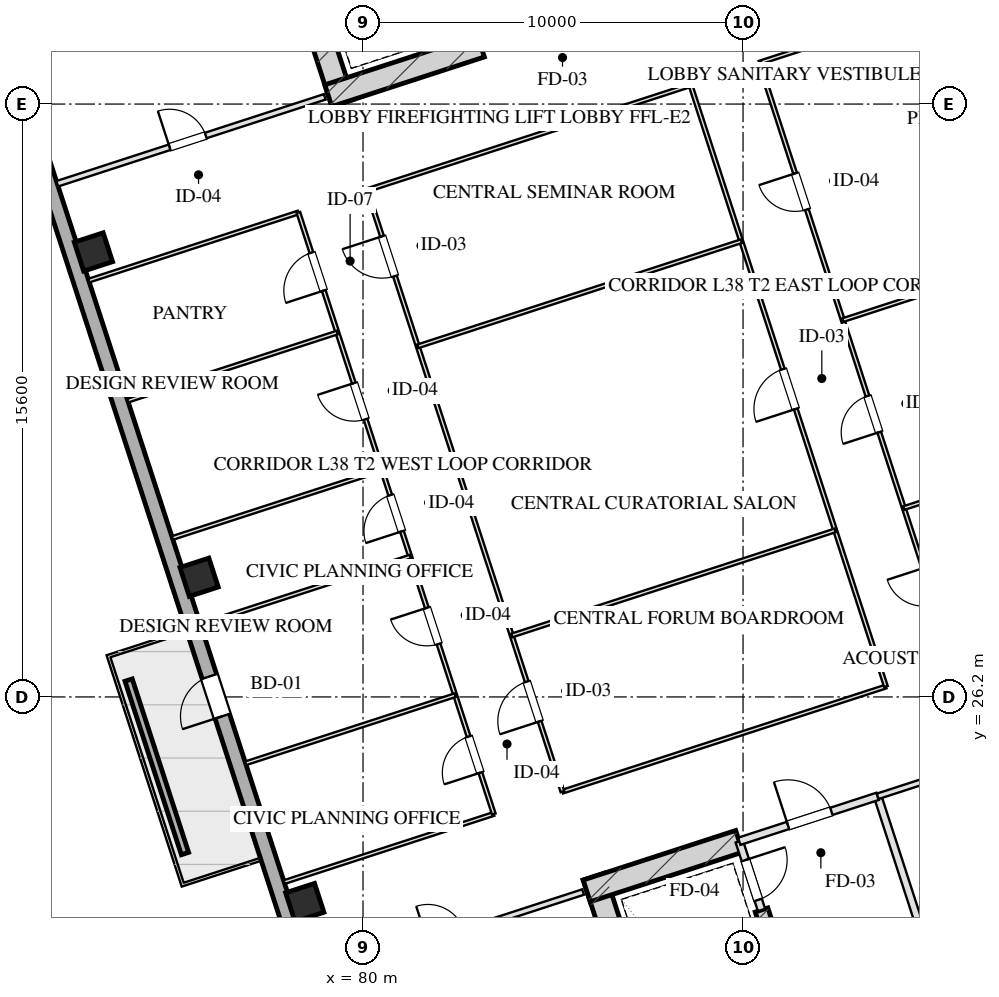
"""IFC4 building model, lengths in metres.
Left out: names, types, materials, properties, quantities, classifications, styles, units other than length and angle.
Written with IfcOpenShell. Run it as: python <this file> out.ifc"""

import sys

from ifc_helpers import new_model, si_unit, direction, frame, frame_2d, origin, origin_2d, place, context, subcontext, project, spatial, rectangle, hollow_rectangle, extrude, element, fill, save


model = new_model("IFC4")
c1 = context("Model", 3, precision=1e-05, world=origin(), true_north=direction((0.0, 1.0)))
c2 = subcontext(c1, "Body", "Model", "MODEL_VIEW")
j1 = project(units=[si_unit("LENGTHUNIT", "METRE"), si_unit("PLANEANGLEUNIT", "RADIAN")], contexts=[c1])
p1 = place(None, origin())
s1 = spatial("IfcSite", under=j1, at=p1, CompositionType="ELEMENT")
p2 = place(p1, origin())
s2 = spatial("IfcBuilding", under=s1, at=p2, CompositionType="ELEMENT")
p3 = place(p2, frame((0.0, 0.0, 146.05)))
s3 = spatial("IfcBuildingStorey", under=s2, at=p3, CompositionType="ELEMENT", Elevation=146.05)
p4 = place(p3, frame((86.078, 21.475, 0.0), z_axis=(0.0, 0.0, 1.0), x_axis=(0.309017938678, -0.951056209472, 0.0)))
e1 = element("IfcWall", 1, at=p4, inside=s3, PredefinedType="SHEAR", context=c2, shape_type="SweptSolid", body=[
    extrude(rectangle(XDim=9.48, YDim=0.6, at=frame_2d((4.74, 0.0))), origin(), (0.0, 0.0, 1.0), 3.45),
])
p5 = place(p3, frame((90.486, 20.594, 0.0), z_axis=(0.0, 0.0, 1.0), x_axis=(0.309020428229, -0.951055400562, 0.0)))
e2 = element("IfcWall", 2, at=p5, inside=s3, PredefinedType="SHEAR", context=c2, shape_type="SweptSolid", body=[
    extrude(rectangle(XDim=6.98, YDim=0.35, at=frame_2d((3.49, 0.0))), origin(), (0.0, 0.0, 1.0), 3.45),
])
p6 = place(p3, frame((85.886, 21.097, 0.0), z_axis=(0.0, 0.0, 1.0), x_axis=(0.951068073652, 0.308981422225, 0.0)))
e3 = element("IfcWall", 3, at=p6, inside=s3, PredefinedType="SHEAR", context=c2, shape_type="SweptSolid", body=[
    extrude(rectangle(XDim=4.22, YDim=0.6, at=frame_2d((2.11, 0.0))), origin(), (0.0, 0.0, 1.0), 3.45),
])
p7 = place(p3, frame((79.466, 41.828, 0.0), z_axis=(0.0, 0.0, 1.0), x_axis=(-0.309041232772, 0.951048640421, 0.0)))
e4 = element("IfcWall", 4, at=p7, inside=s3, PredefinedType="SHEAR", context=c2, shape_type="SweptSolid", body=[
    extrude(rectangle(XDim=9.48, YDim=0.6, at=frame_2d((4.74, 0.0))), origin(), (0.0, 0.0, 1.0), 3.45),
])
p8 = place(p3, frame((79.087, 42.021, 0.0), z_axis=(0.0, 0.0, 1.0), x_axis=(0.951062550203, 0.3089984233, 0.0)))
e5 = element("IfcWall", 5, at=p8, inside=s3, PredefinedType="SHEAR", context=c2, shape_type="SweptSolid", body=[
    extrude(rectangle(XDim=4.22, YDim=0.6, at=frame_2d((2.11, 0.0))), origin(), (0.0, 0.0, 1.0), 3.45),
])
for number, where, z_axis, x_axis in (
    (6, (78.468, 20.79, 0.0), (0.0, 0.0, 1.0), (0.951, 0.309, 0.0)),
    (7, (75.687, 29.349, 0.0), (0.0, 0.0, 1.0), (0.951, 0.309, 0.0)),
    (8, (72.906, 37.909, 0.0), (0.0, 0.0, 1.0), (0.951, 0.309, 0.0)),
):
    element("IfcColumn", number, at=place(p3, frame(where, z_axis=z_axis, x_axis=x_axis)), inside=s3, PredefinedType="COLUMN", context=c2, shape_type="SweptSolid", body=[
        extrude(hollow_rectangle(XDim=0.8, YDim=0.8, WallThickness=0.028, at=origin_2d()), origin(), (0.0, 0.0, 1.0), 3.451),
    ])
p9 = place(p3, frame((81.776, 8.827, 0.0), z_axis=(0.0, 0.0, 1.0), x_axis=(-0.309014228706, 0.951057414911, 0.0)))
e9 = element("IfcWall", 9, at=p9, inside=s3, PredefinedType="SOLIDWALL", context=c2, shape_type="SweptSolid", body=[
    extrude(rectangle(XDim=42.8, YDim=0.4, at=frame_2d((21.4, 0.0))), origin(), (0.0, 0.0, 1.0), 2.61),
])
p10 = place(p9, frame((17.733, 0.0, 0.0)))
e10 = element("IfcOpeningElement", 10, at=p10, cuts=e9, PredefinedType="OPENING", context=c2, shape_type="SweptSolid", body=[
    extrude(rectangle(XDim=1.1, YDim=2.15, at=frame_2d((0.55, 1.075))), frame((0.0, 0.21, 0.0), z_axis=(0.0, -1.0, 0.0), x_axis=(1.0, 0.0, 0.0)), (0.0, 0.0, 1.0), 0.42),
])
p11 = place(p3, frame((75.315, 22.079, 0.0), z_axis=(0.0, 0.0, 1.0), x_axis=(-0.309032019345, 0.951051634255, 0.0)))
e11 = element("IfcWall", 11, at=p11, inside=s3, PredefinedType="PARAPET", context=c2, shape_type="SweptSolid", body=[
    extrude(rectangle(XDim=4.8, YDim=0.2, at=frame_2d((2.4, 0.0))), origin(), (0.0, 0.0, 1.0), 0.75),
])
p12 = place(p3, frame((89.899, 22.401, 0.0), z_axis=(0.0, 0.0, 1.0), x_axis=(0.308932062672, -0.951084108086, 0.0)))
e12 = element("IfcWall", 12, at=p12, inside=s3, PredefinedType="PARTITIONING", context=c2, shape_type="SweptSolid", body=[
    extrude(rectangle(XDim=1.9, YDim=0.2, at=frame_2d((0.95, 0.0))), origin(), (0.0, 0.0, 1.0), 3.175),
])
p13 = place(p12, frame((0.52, 0.0, 0.0)))
e13 = element("IfcOpeningElement", 13, at=p13, cuts=e12, PredefinedType="OPENING", context=c2, shape_type="SweptSolid", body=[
    extrude(rectangle(XDim=1.1, YDim=2.05, at=frame_2d((0.55, 1.025))), frame((0.0, 0.11, 0.0), z_axis=(0.0, -1.0, 0.0), x_axis=(1.0, 0.0, 0.0)), (0.0, 0.0, 1.0), 0.22),
])
p14 = place(p3, frame((93.542, 23.585, 0.0), z_axis=(0.0, 0.0, 1.0), x_axis=(0.309042196757, -0.951048327176, 0.0)))
e14 = element("IfcWall", 14, at=p14, inside=s3, PredefinedType="PARTITIONING", context=c2, shape_type="SweptSolid", body=[
    extrude(rectangle(XDim=8.43, YDim=0.2, at=frame_2d((4.215, 0.0))), origin(), (0.0, 0.0, 1.0), 3.175),
])
p15 = place(p3, frame((89.899, 22.401, 0.0), z_axis=(0.0, 0.0, 1.0), x_axis=(0.951046716504, 0.309047153403, 0.0)))
e15 = element("IfcWall", 15, at=p15, inside=s3, PredefinedType="PARTITIONING", context=c2, shape_type="SweptSolid", body=[
    extrude(rectangle(XDim=3.83, YDim=0.2, at=frame_2d((1.915, 0.0))), origin(), (0.0, 0.0, 1.0), 3.175),
])
p16 = place(p15, frame((1.35, 0.0, 0.0)))
e16 = element("IfcOpeningElement", 16, at=p16, cuts=e15, PredefinedType="OPENING", context=c2, shape_type="SweptSolid", body=[
    extrude(rectangle(XDim=1.2, YDim=2.05, at=frame_2d((0.6, 1.025))), frame((0.0, 0.11, 0.0), z_axis=(0.0, -1.0, 0.0), x_axis=(1.0, 0.0, 0.0)), (0.0, 0.0, 1.0), 0.22),
])
p17 = place(p3, frame((93.542, 23.585, 0.0), z_axis=(0.0, 0.0, 1.0), x_axis=(0.951063829732, 0.308994485023, 0.0)))
e17 = element("IfcWall", 17, at=p17, inside=s3, PredefinedType="PARTITIONING", context=c2, shape_type="SweptSolid", body=[
    extrude(rectangle(XDim=4.4, YDim=0.15, at=frame_2d((2.2, 0.0))), origin(), (0.0, 0.0, 1.0), 3.175),
])
p18 = place(p17, frame((1.5, 0.0, 0.0)))
e18 = element("IfcOpeningElement", 18, at=p18, cuts=e17, PredefinedType="OPENING", context=c2, shape_type="SweptSolid", body=[
    extrude(rectangle(XDim=1.0, YDim=2.05, at=frame_2d((0.5, 1.025))), frame((0.0, 0.085, 0.0), z_axis=(0.0, -1.0, 0.0), x_axis=(1.0, 0.0, 0.0)), (0.0, 0.0, 1.0), 0.17),
])
p19 = place(p3, frame((78.753, 18.78, 0.0), z_axis=(0.0, 0.0, 1.0), x_axis=(0.951060977215, 0.309003264738, 0.0)))
e19 = element("IfcWall", 19, at=p19, inside=s3, PredefinedType="PARTITIONING", context=c2, shape_type="SweptSolid", body=[
    extrude(rectangle(XDim=7.4, YDim=0.15, at=frame_2d((3.7, 0.0))), origin(), (0.0, 0.0, 1.0), 3.175),
])
p20 = place(p19, frame((3.108, 0.0, 0.0)))
e20 = element("IfcOpeningElement", 20, at=p20, cuts=e19, PredefinedType="OPENING", context=c2, shape_type="SweptSolid", body=[
    extrude(rectangle(XDim=1.0, YDim=2.05, at=frame_2d((0.5, 1.025))), frame((0.0, 0.085, 0.0), z_axis=(0.0, -1.0, 0.0), x_axis=(1.0, 0.0, 0.0)), (0.0, 0.0, 1.0), 0.17),
])
p21 = place(p3, frame((71.955, 39.703, 0.0), z_axis=(0.0, 0.0, 1.0), x_axis=(0.951060977215, 0.309003264738, 0.0)))
e21 = element("IfcWall", 21, at=p21, inside=s3, PredefinedType="PARTITIONING", context=c2, shape_type="SweptSolid", body=[
    extrude(rectangle(XDim=7.4, YDim=0.15, at=frame_2d((3.7, 0.0))), origin(), (0.0, 0.0, 1.0), 3.175),
])
p22 = place(p21, frame((3.108, 0.0, 0.0)))
e22 = element("IfcOpeningElement", 22, at=p22, cuts=e21, PredefinedType="OPENING", context=c2, shape_type="SweptSolid", body=[
    extrude(rectangle(XDim=1.0, YDim=2.05, at=frame_2d((0.5, 1.025))), frame((0.0, 0.085, 0.0), z_axis=(0.0, -1.0, 0.0), x_axis=(1.0, 0.0, 0.0)), (0.0, 0.0, 1.0), 0.17),
])
p23 = place(p3, frame((77.925, 21.328, 0.0), z_axis=(0.0, 0.0, 1.0), x_axis=(0.951059431056, 0.309008023519, 0.0)))
e23 = element("IfcWall", 23, at=p23, inside=s3, PredefinedType="MOVABLE", context=c2, shape_type="SweptSolid", body=[
    extrude(rectangle(XDim=5.8, YDim=0.1, at=frame_2d((2.9, 0.0))), origin(), (0.0, 0.0, 1.0), 3.175),
])
p24 = place(p3, frame((85.248, 23.708, 0.0), z_axis=(0.0, 0.0, 1.0), x_axis=(0.951059123431, 0.309008970321, 0.0)))
e24 = element("IfcWall", 24, at=p24, inside=s3, PredefinedType="MOVABLE", context=c2, shape_type="SweptSolid", body=[
    extrude(rectangle(XDim=8.95, YDim=0.1, at=frame_2d((4.475, 0.0))), origin(), (0.0, 0.0, 1.0), 3.175),
])
p25 = place(p3, frame((72.783, 37.154, 0.0), z_axis=(0.0, 0.0, 1.0), x_axis=(0.951047059821, 0.309046096893, 0.0)))
e25 = element("IfcWall", 25, at=p25, inside=s3, PredefinedType="MOVABLE", context=c2, shape_type="SweptSolid", body=[
    extrude(rectangle(XDim=5.8, YDim=0.1, at=frame_2d((2.9, 0.0))), origin(), (0.0, 0.0, 1.0), 3.175),
])
p26 = place(p3, frame((80.106, 39.533, 0.0), z_axis=(0.0, 0.0, 1.0), x_axis=(0.951059123431, 0.309008970321, 0.0)))
e26 = element("IfcWall", 26, at=p26, inside=s3, PredefinedType="MOVABLE", context=c2, shape_type="SweptSolid", body=[
    extrude(rectangle(XDim=8.95, YDim=0.1, at=frame_2d((4.475, 0.0))), origin(), (0.0, 0.0, 1.0), 3.175),
])
p27 = place(p3, frame((90.425, 42.886, 0.0), z_axis=(0.0, 0.0, 1.0), x_axis=(0.95105749975, 0.309013967595, 0.0)))
e27 = element("IfcWall", 27, at=p27, inside=s3, PredefinedType="MOVABLE", context=c2, shape_type="SweptSolid", body=[
    extrude(rectangle(XDim=12.25, YDim=0.1, at=frame_2d((6.125, 0.0))), origin(), (0.0, 0.0, 1.0), 3.175),
])
p28 = place(p3, frame((83.441, 23.121, 0.0), z_axis=(0.0, 0.0, 1.0), x_axis=(-0.30901773025, 0.951056277195, 0.0)))
e28 = element("IfcWall", 28, at=p28, inside=s3, PredefinedType="MOVABLE", context=c2, shape_type="SweptSolid", body=[
    extrude(rectangle(XDim=16.64, YDim=0.1, at=frame_2d((8.32, 0.0))), origin(), (0.0, 0.0, 1.0), 3.175),
])
p29 = place(p28, frame((1.143, 0.0, 0.0)))
e29 = element("IfcOpeningElement", 29, at=p29, cuts=e28, PredefinedType="OPENING", context=c2, shape_type="SweptSolid", body=[
    extrude(rectangle(XDim=1.0, YDim=2.05, at=frame_2d((0.5, 1.025))), frame((0.0, 0.06, 0.0), z_axis=(0.0, -1.0, 0.0), x_axis=(1.0, 0.0, 0.0)), (0.0, 0.0, 1.0), 0.12),
])
p30 = place(p28, frame((4.703, 0.0, 0.0)))
e30 = element("IfcOpeningElement", 30, at=p30, cuts=e28, PredefinedType="OPENING", context=c2, shape_type="SweptSolid", body=[
    extrude(rectangle(XDim=1.0, YDim=2.05, at=frame_2d((0.5, 1.025))), frame((0.0, 0.06, 0.0), z_axis=(0.0, -1.0, 0.0), x_axis=(1.0, 0.0, 0.0)), (0.0, 0.0, 1.0), 0.12),
])
p31 = place(p28, frame((7.82, 0.0, 0.0)))
e31 = element("IfcOpeningElement", 31, at=p31, cuts=e28, PredefinedType="OPENING", context=c2, shape_type="SweptSolid", body=[
    extrude(rectangle(XDim=1.0, YDim=2.05, at=frame_2d((0.5, 1.025))), frame((0.0, 0.06, 0.0), z_axis=(0.0, -1.0, 0.0), x_axis=(1.0, 0.0, 0.0)), (0.0, 0.0, 1.0), 0.12),
])
p32 = place(p28, frame((10.92, 0.0, 0.0)))
e32 = element("IfcOpeningElement", 32, at=p32, cuts=e28, PredefinedType="OPENING", context=c2, shape_type="SweptSolid", body=[
    extrude(rectangle(XDim=1.0, YDim=2.05, at=frame_2d((0.5, 1.025))), frame((0.0, 0.06, 0.0), z_axis=(0.0, -1.0, 0.0), x_axis=(1.0, 0.0, 0.0)), (0.0, 0.0, 1.0), 0.12),
])
p33 = place(p28, frame((14.48, 0.0, 0.0)))
e33 = element("IfcOpeningElement", 33, at=p33, cuts=e28, PredefinedType="OPENING", context=c2, shape_type="SweptSolid", body=[
    extrude(rectangle(XDim=1.05, YDim=2.05, at=frame_2d((0.525, 1.025))), frame((0.0, 0.06, 0.0), z_axis=(0.0, -1.0, 0.0), x_axis=(1.0, 0.0, 0.0)), (0.0, 0.0, 1.0), 0.12),
])
p34 = place(p3, frame((85.248, 23.708, 0.0), z_axis=(0.0, 0.0, 1.0), x_axis=(-0.309004459387, 0.951060589068, 0.0)))
e34 = element("IfcWall", 34, at=p34, inside=s3, PredefinedType="MOVABLE", context=c2, shape_type="SweptSolid", body=[
    extrude(rectangle(XDim=16.64, YDim=0.1, at=frame_2d((8.32, 0.0))), origin(), (0.0, 0.0, 1.0), 3.175),
])
p35 = place(p34, frame((1.944, 0.0, 0.0)))
e35 = element("IfcOpeningElement", 35, at=p35, cuts=e34, PredefinedType="OPENING", context=c2, shape_type="SweptSolid", body=[
    extrude(rectangle(XDim=1.1, YDim=2.05, at=frame_2d((0.55, 1.025))), frame((0.0, 0.06, 0.0), z_axis=(0.0, -1.0, 0.0), x_axis=(1.0, 0.0, 0.0)), (0.0, 0.0, 1.0), 0.12),
])
p36 = place(p34, frame((14.264, 0.0, 0.0)))
e36 = element("IfcOpeningElement", 36, at=p36, cuts=e34, PredefinedType="OPENING", context=c2, shape_type="SweptSolid", body=[
    extrude(rectangle(XDim=1.1, YDim=2.05, at=frame_2d((0.55, 1.025))), frame((0.0, 0.06, 0.0), z_axis=(0.0, -1.0, 0.0), x_axis=(1.0, 0.0, 0.0)), (0.0, 0.0, 1.0), 0.12),
])
p37 = place(p3, frame((93.76, 26.473, 0.0), z_axis=(0.0, 0.0, 1.0), x_axis=(-0.309004459387, 0.951060589068, 0.0)))
e37 = element("IfcWall", 37, at=p37, inside=s3, PredefinedType="MOVABLE", context=c2, shape_type="SweptSolid", body=[
    extrude(rectangle(XDim=16.64, YDim=0.1, at=frame_2d((8.32, 0.0))), origin(), (0.0, 0.0, 1.0), 3.175),
])
p38 = place(p37, frame((7.68, 0.0, 0.0)))
e38 = element("IfcOpeningElement", 38, at=p38, cuts=e37, PredefinedType="OPENING", context=c2, shape_type="SweptSolid", body=[
    extrude(rectangle(XDim=1.1, YDim=2.05, at=frame_2d((0.55, 1.025))), frame((0.0, 0.06, 0.0), z_axis=(0.0, -1.0, 0.0), x_axis=(1.0, 0.0, 0.0)), (0.0, 0.0, 1.0), 0.12),
])
p39 = place(p3, frame((95.567, 27.061, 0.0), z_axis=(0.0, 0.0, 1.0), x_axis=(-0.30901773025, 0.951056277195, 0.0)))
e39 = element("IfcWall", 39, at=p39, inside=s3, PredefinedType="MOVABLE", context=c2, shape_type="SweptSolid", body=[
    extrude(rectangle(XDim=16.64, YDim=0.1, at=frame_2d((8.32, 0.0))), origin(), (0.0, 0.0, 1.0), 3.175),
])
p40 = place(p39, frame((1.66, 0.0, 0.0)))
e40 = element("IfcOpeningElement", 40, at=p40, cuts=e39, PredefinedType="OPENING", context=c2, shape_type="SweptSolid", body=[
    extrude(rectangle(XDim=1.0, YDim=2.05, at=frame_2d((0.5, 1.025))), frame((0.0, 0.06, 0.0), z_axis=(0.0, -1.0, 0.0), x_axis=(1.0, 0.0, 0.0)), (0.0, 0.0, 1.0), 0.12),
])
p41 = place(p39, frame((6.42, 0.0, 0.0)))
e41 = element("IfcOpeningElement", 41, at=p41, cuts=e39, PredefinedType="OPENING", context=c2, shape_type="SweptSolid", body=[
    extrude(rectangle(XDim=1.0, YDim=2.05, at=frame_2d((0.5, 1.025))), frame((0.0, 0.06, 0.0), z_axis=(0.0, -1.0, 0.0), x_axis=(1.0, 0.0, 0.0)), (0.0, 0.0, 1.0), 0.12),
])
p42 = place(p39, frame((12.58, 0.0, 0.0)))
e42 = element("IfcOpeningElement", 42, at=p42, cuts=e39, PredefinedType="OPENING", context=c2, shape_type="SweptSolid", body=[
    extrude(rectangle(XDim=1.0, YDim=2.05, at=frame_2d((0.5, 1.025))), frame((0.0, 0.06, 0.0), z_axis=(0.0, -1.0, 0.0), x_axis=(1.0, 0.0, 0.0)), (0.0, 0.0, 1.0), 0.12),
])
p43 = place(p3, frame((83.913, 27.816, 0.0), z_axis=(0.0, 0.0, 1.0), x_axis=(0.951059123431, 0.309008970321, 0.0)))
e43 = element("IfcWall", 43, at=p43, inside=s3, PredefinedType="MOVABLE", context=c2, shape_type="SweptSolid", body=[
    extrude(rectangle(XDim=8.95, YDim=0.1, at=frame_2d((4.475, 0.0))), origin(), (0.0, 0.0, 1.0), 3.175),
])
p44 = place(p3, frame((81.441, 35.425, 0.0), z_axis=(0.0, 0.0, 1.0), x_axis=(0.951056518616, 0.309016987233, 0.0)))
e44 = element("IfcWall", 44, at=p44, inside=s3, PredefinedType="MOVABLE", context=c2, shape_type="SweptSolid", body=[
    extrude(rectangle(XDim=8.95, YDim=0.1, at=frame_2d((4.475, 0.0))), origin(), (0.0, 0.0, 1.0), 3.175),
])
for number, where, z_axis, x_axis in (
    (45, (76.909, 24.454, 0.0), (0.0, 0.0, 1.0), (0.951, 0.309, 0.0)),
    (46, (75.725, 28.1, 0.0), (0.0, 0.0, 1.0), (0.951, 0.309, 0.0)),
    (47, (74.983, 30.382, 0.0), (0.0, 0.0, 1.0), (0.951, 0.309, 0.0)),
    (48, (73.809, 33.996, 0.0), (0.0, 0.0, 1.0), (0.951, 0.309, 0.0)),
):
    element("IfcWall", number, at=place(p3, frame(where, z_axis=z_axis, x_axis=x_axis)), inside=s3, PredefinedType="MOVABLE", context=c2, shape_type="SweptSolid", body=[
        extrude(rectangle(XDim=5.8, YDim=0.1, at=frame_2d((2.9, 0.0))), origin(), (0.0, 0.0, 1.0), 3.175),
    ])
for number, where, z_axis, x_axis in (
    (49, (94.232, 31.169, 0.0), (0.0, 0.0, 1.0), (0.951, 0.309, 0.0)),
    (50, (92.625, 36.115, 0.0), (0.0, 0.0, 1.0), (0.951, 0.309, 0.0)),
):
    element("IfcWall", number, at=place(p3, frame(where, z_axis=z_axis, x_axis=x_axis)), inside=s3, PredefinedType="MOVABLE", context=c2, shape_type="SweptSolid", body=[
        extrude(rectangle(XDim=12.25, YDim=0.1, at=frame_2d((6.125, 0.0))), origin(), (0.0, 0.0, 1.0), 3.175),
    ])
p45 = place(p10, origin())
e51 = element("IfcDoor", 51, at=p45, inside=s3, OperationType="SINGLE_SWING_LEFT", PredefinedType="DOOR", context=c2, shape_type="SweptSolid", body=[
    extrude(rectangle(XDim=1.1, YDim=2.15, at=frame_2d((0.55, 1.075))), frame((0.0, 0.025, 0.0), z_axis=(0.0, -1.0, 0.0), x_axis=(1.0, 0.0, 0.0)), (0.0, 0.0, 1.0), 0.05),
])
fill(e10, e51)
p46 = place(p13, origin())
e52 = element("IfcDoor", 52, at=p46, inside=s3, OperationType="SINGLE_SWING_LEFT", PredefinedType="DOOR", context=c2, shape_type="SweptSolid", body=[
    extrude(rectangle(XDim=1.1, YDim=2.05, at=frame_2d((0.55, 1.025))), frame((0.0, 0.025, 0.0), z_axis=(0.0, -1.0, 0.0), x_axis=(1.0, 0.0, 0.0)), (0.0, 0.0, 1.0), 0.05),
])
fill(e13, e52)
p47 = place(p16, origin())
e53 = element("IfcDoor", 53, at=p47, inside=s3, OperationType="SINGLE_SWING_LEFT", PredefinedType="DOOR", context=c2, shape_type="SweptSolid", body=[
    extrude(rectangle(XDim=1.2, YDim=2.05, at=frame_2d((0.6, 1.025))), frame((0.0, 0.025, 0.0), z_axis=(0.0, -1.0, 0.0), x_axis=(1.0, 0.0, 0.0)), (0.0, 0.0, 1.0), 0.05),
])
fill(e16, e53)
p48 = place(p22, origin())
e54 = element("IfcDoor", 54, at=p48, inside=s3, OperationType="SINGLE_SWING_LEFT", PredefinedType="DOOR", context=c2, shape_type="SweptSolid", body=[
    extrude(rectangle(XDim=1.0, YDim=2.05, at=frame_2d((0.5, 1.025))), frame((0.0, 0.025, 0.0), z_axis=(0.0, -1.0, 0.0), x_axis=(1.0, 0.0, 0.0)), (0.0, 0.0, 1.0), 0.05),
])
fill(e22, e54)
p49 = place(p29, origin())
e55 = element("IfcDoor", 55, at=p49, inside=s3, OperationType="SINGLE_SWING_LEFT", PredefinedType="DOOR", context=c2, shape_type="SweptSolid", body=[
    extrude(rectangle(XDim=1.0, YDim=2.05, at=frame_2d((0.5, 1.025))), frame((0.0, 0.025, 0.0), z_axis=(0.0, -1.0, 0.0), x_axis=(1.0, 0.0, 0.0)), (0.0, 0.0, 1.0), 0.05),
])
fill(e29, e55)
p50 = place(p30, origin())
e56 = element("IfcDoor", 56, at=p50, inside=s3, OperationType="SINGLE_SWING_RIGHT", PredefinedType="DOOR", context=c2, shape_type="SweptSolid", body=[
    extrude(rectangle(XDim=1.0, YDim=2.05, at=frame_2d((0.5, 1.025))), frame((0.0, 0.025, 0.0), z_axis=(0.0, -1.0, 0.0), x_axis=(1.0, 0.0, 0.0)), (0.0, 0.0, 1.0), 0.05),
])
fill(e30, e56)
p51 = place(p31, origin())
e57 = element("IfcDoor", 57, at=p51, inside=s3, OperationType="SINGLE_SWING_LEFT", PredefinedType="DOOR", context=c2, shape_type="SweptSolid", body=[
    extrude(rectangle(XDim=1.0, YDim=2.05, at=frame_2d((0.5, 1.025))), frame((0.0, 0.025, 0.0), z_axis=(0.0, -1.0, 0.0), x_axis=(1.0, 0.0, 0.0)), (0.0, 0.0, 1.0), 0.05),
])
fill(e31, e57)
p52 = place(p32, origin())
e58 = element("IfcDoor", 58, at=p52, inside=s3, OperationType="SINGLE_SWING_RIGHT", PredefinedType="DOOR", context=c2, shape_type="SweptSolid", body=[
    extrude(rectangle(XDim=1.0, YDim=2.05, at=frame_2d((0.5, 1.025))), frame((0.0, 0.025, 0.0), z_axis=(0.0, -1.0, 0.0), x_axis=(1.0, 0.0, 0.0)), (0.0, 0.0, 1.0), 0.05),
])
fill(e32, e58)
p53 = place(p33, origin())
e59 = element("IfcDoor", 59, at=p53, inside=s3, OperationType="SINGLE_SWING_LEFT", PredefinedType="DOOR", context=c2, shape_type="SweptSolid", body=[
    extrude(rectangle(XDim=1.05, YDim=2.05, at=frame_2d((0.525, 1.025))), frame((0.0, 0.025, 0.0), z_axis=(0.0, -1.0, 0.0), x_axis=(1.0, 0.0, 0.0)), (0.0, 0.0, 1.0), 0.05),
])
fill(e33, e59)
p54 = place(p35, origin())
e60 = element("IfcDoor", 60, at=p54, inside=s3, OperationType="SINGLE_SWING_LEFT", PredefinedType="DOOR", context=c2, shape_type="SweptSolid", body=[
    extrude(rectangle(XDim=1.1, YDim=2.05, at=frame_2d((0.55, 1.025))), frame((0.0, 0.025, 0.0), z_axis=(0.0, -1.0, 0.0), x_axis=(1.0, 0.0, 0.0)), (0.0, 0.0, 1.0), 0.05),
])
fill(e35, e60)
p55 = place(p36, origin())
e61 = element("IfcDoor", 61, at=p55, inside=s3, OperationType="SINGLE_SWING_RIGHT", PredefinedType="DOOR", context=c2, shape_type="SweptSolid", body=[
    extrude(rectangle(XDim=1.1, YDim=2.05, at=frame_2d((0.55, 1.025))), frame((0.0, 0.025, 0.0), z_axis=(0.0, -1.0, 0.0), x_axis=(1.0, 0.0, 0.0)), (0.0, 0.0, 1.0), 0.05),
])
fill(e36, e61)
p56 = place(p38, origin())
e62 = element("IfcDoor", 62, at=p56, inside=s3, OperationType="SINGLE_SWING_LEFT", PredefinedType="DOOR", context=c2, shape_type="SweptSolid", body=[
    extrude(rectangle(XDim=1.1, YDim=2.05, at=frame_2d((0.55, 1.025))), frame((0.0, 0.025, 0.0), z_axis=(0.0, -1.0, 0.0), x_axis=(1.0, 0.0, 0.0)), (0.0, 0.0, 1.0), 0.05),
])
fill(e38, e62)
p57 = place(p41, origin())
e63 = element("IfcDoor", 63, at=p57, inside=s3, OperationType="SINGLE_SWING_LEFT", PredefinedType="DOOR", context=c2, shape_type="SweptSolid", body=[
    extrude(rectangle(XDim=1.0, YDim=2.05, at=frame_2d((0.5, 1.025))), frame((0.0, 0.025, 0.0), z_axis=(0.0, -1.0, 0.0), x_axis=(1.0, 0.0, 0.0)), (0.0, 0.0, 1.0), 0.05),
])
fill(e41, e63)
p58 = place(p42, origin())
e64 = element("IfcDoor", 64, at=p58, inside=s3, OperationType="SINGLE_SWING_RIGHT", PredefinedType="DOOR", context=c2, shape_type="SweptSolid", body=[
    extrude(rectangle(XDim=1.0, YDim=2.05, at=frame_2d((0.5, 1.025))), frame((0.0, 0.025, 0.0), z_axis=(0.0, -1.0, 0.0), x_axis=(1.0, 0.0, 0.0)), (0.0, 0.0, 1.0), 0.05),
])
fill(e42, e64)
save(model, sys.argv[1])
